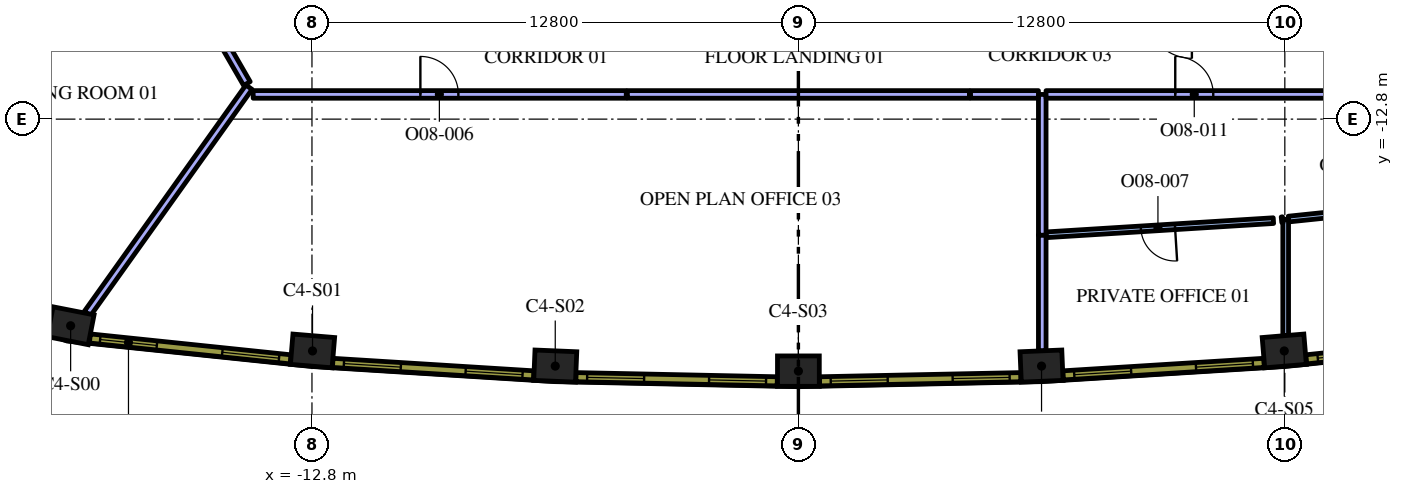
"""IFC4 building model, lengths in metres.
Left out: names, types, materials, properties, quantities, classifications, styles, units other than length and angle.
Written with IfcOpenShell. Run it as: python <this file> out.ifc"""

import sys

from ifc_helpers import new_model, si_unit, direction, frame, frame_2d, origin, origin_2d, place, context, subcontext, project, spatial, rectangle, extrude, element, fill, save


model = new_model("IFC4")
c1 = context("Model", 3, precision=1e-05, world=origin(), true_north=direction((0.0, 1.0)))
c2 = subcontext(c1, "Body", "Model", "MODEL_VIEW")
j1 = project(units=[si_unit("LENGTHUNIT", "METRE"), si_unit("PLANEANGLEUNIT", "RADIAN")], contexts=[c1])
p1 = place(None, origin())
s1 = spatial("IfcSite", under=j1, at=p1, CompositionType="ELEMENT")
p2 = place(p1, origin())
s2 = spatial("IfcBuilding", under=s1, at=p2, CompositionType="ELEMENT")
p3 = place(p2, frame((0.0, 0.0, 235.2)))
s3 = spatial("IfcBuildingStorey", under=s2, at=p3, CompositionType="ELEMENT", Elevation=235.2)
for number, where, z_axis, x_axis in (
    (1, (-19.15, -18.237, 0.0), (0.0, 0.0, 1.0), (0.981, -0.192, 0.0)),
    (2, (-12.785, -18.9, 0.0), (0.0, 0.0, 1.0), (0.997, -0.083, 0.0)),
    (3, (-6.398, -19.298, 0.0), (0.0, 0.0, 1.0), (0.999, -0.041, 0.0)),
    (4, (0.0, -19.431, 0.0), (0.0, 0.0, 1.0), (1.0, 0.0, 0.0)),
    (5, (6.398, -19.298, 0.0), (0.0, 0.0, 1.0), (0.999, 0.041, 0.0)),
    (6, (12.785, -18.9, 0.0), (0.0, 0.0, 1.0), (0.997, 0.083, 0.0)),
):
    element("IfcColumn", number, at=place(p3, frame(where, z_axis=z_axis, x_axis=x_axis)), inside=s3, PredefinedType="COLUMN", context=c2, shape_type="SweptSolid", body=[
        extrude(rectangle(XDim=1.1, YDim=0.8, at=origin_2d()), origin(), (0.0, 0.0, 1.0), 4.2),
    ])
p4 = place(p3, frame((-14.457, -11.96, 0.0), z_axis=(0.0, 0.0, 1.0), x_axis=(-0.581023578026, -0.813886725397, 0.0)))
e7 = element("IfcWall", 7, at=p4, inside=s3, PredefinedType="PARTITIONING", context=c2, shape_type="SweptSolid", body=[
    extrude(rectangle(XDim=7.318, YDim=0.2, at=frame_2d((3.659, 0.0))), origin(), (0.0, 0.0, 1.0), 3.45),
])
p5 = place(p3, frame((-17.531, -6.635, 0.0), z_axis=(0.0, 0.0, 1.0), x_axis=(0.500009459589, -0.866019942219, 0.0)))
e8 = element("IfcWall", 8, at=p5, inside=s3, PredefinedType="PARTITIONING", context=c2, shape_type="SweptSolid", body=[
    extrude(rectangle(XDim=6.038, YDim=0.2, at=frame_2d((3.019, 0.0))), origin(), (0.0, 0.0, 1.0), 3.45),
])
p6 = place(p5, frame((2.5, 0.0, 0.0)))
e9 = element("IfcOpeningElement", 9, at=p6, cuts=e8, PredefinedType="OPENING", context=c2, shape_type="SweptSolid", body=[
    extrude(rectangle(XDim=1.0, YDim=2.1, at=frame_2d((0.5, 1.05))), frame((0.0, 0.11, 0.0), z_axis=(0.0, -1.0, 0.0), x_axis=(1.0, 0.0, 0.0)), (0.0, 0.0, 1.0), 0.22),
])
p7 = place(p3, frame((6.417, -15.846, 0.0), z_axis=(0.0, 0.0, 1.0), x_axis=(0.0, -1.0, 0.0)))
e10 = element("IfcWall", 10, at=p7, inside=s3, PredefinedType="PARTITIONING", context=c2, shape_type="SweptSolid", body=[
    extrude(rectangle(XDim=3.051, YDim=0.2, at=frame_2d((1.525, 0.0))), origin(), (0.0, 0.0, 1.0), 3.45),
])
p8 = place(p3, frame((6.417, -12.15, 0.0), z_axis=(0.0, 0.0, 1.0), x_axis=(0.0, -1.0, 0.0)))
e11 = element("IfcWall", 11, at=p8, inside=s3, PredefinedType="PARTITIONING", context=c2, shape_type="SweptSolid", body=[
    extrude(rectangle(XDim=3.704, YDim=0.2, at=frame_2d((1.852, 0.0))), origin(), (0.0, 0.0, 1.0), 3.45),
])
p9 = place(p3, frame((-4.5, -12.15, 0.0), z_axis=(0.0, 0.0, 1.0), x_axis=(1.0, 0.0, 0.0)))
e12 = element("IfcWall", 12, at=p9, inside=s3, PredefinedType="PARTITIONING", context=c2, shape_type="SweptSolid", body=[
    extrude(rectangle(XDim=9.0, YDim=0.2, at=frame_2d((4.5, 0.0))), origin(), (0.0, 0.0, 1.0), 3.45),
])
p10 = place(p3, frame((-14.347, -12.15, 0.0), z_axis=(0.0, 0.0, 1.0), x_axis=(1.0, 0.0, 0.0)))
e13 = element("IfcWall", 13, at=p10, inside=s3, PredefinedType="PARTITIONING", context=c2, shape_type="SweptSolid", body=[
    extrude(rectangle(XDim=9.817, YDim=0.2, at=frame_2d((4.909, 0.0))), origin(), (0.0, 0.0, 1.0), 3.45),
])
p11 = place(p10, frame((4.4, 0.0, 0.0)))
e14 = element("IfcOpeningElement", 14, at=p11, cuts=e13, PredefinedType="OPENING", context=c2, shape_type="SweptSolid", body=[
    extrude(rectangle(XDim=1.0, YDim=2.1, at=frame_2d((0.5, 1.05))), frame((0.0, 0.11, 0.0), z_axis=(0.0, -1.0, 0.0), x_axis=(1.0, 0.0, 0.0)), (0.0, 0.0, 1.0), 0.22),
])
p12 = place(p3, frame((4.53, -12.15, 0.0), z_axis=(0.0, 0.0, 1.0), x_axis=(1.0, 0.0, 0.0)))
e15 = element("IfcWall", 15, at=p12, inside=s3, PredefinedType="PARTITIONING", context=c2, shape_type="SweptSolid", body=[
    extrude(rectangle(XDim=1.787, YDim=0.2, at=frame_2d((0.894, 0.0))), origin(), (0.0, 0.0, 1.0), 3.45),
])
p13 = place(p3, frame((12.823, -15.437, 0.0), z_axis=(0.0, 0.0, 1.0), x_axis=(0.0, -1.0, 0.0)))
e16 = element("IfcWall", 16, at=p13, inside=s3, PredefinedType="PARTITIONING", context=c2, shape_type="SweptSolid", body=[
    extrude(rectangle(XDim=3.058, YDim=0.15, at=frame_2d((1.529, 0.0))), origin(), (0.0, 0.0, 1.0), 3.45),
])
p14 = place(p3, frame((12.5, -15.471, 0.0), z_axis=(0.0, 0.0, 1.0), x_axis=(-0.998061916726, -0.0622286942, 0.0)))
e17 = element("IfcWall", 17, at=p14, inside=s3, PredefinedType="PARTITIONING", context=c2, shape_type="SweptSolid", body=[
    extrude(rectangle(XDim=5.995, YDim=0.15, at=frame_2d((2.998, 0.0))), origin(), (0.0, 0.0, 1.0), 3.45),
])
p15 = place(p14, frame((2.595, 0.0, 0.0)))
e18 = element("IfcOpeningElement", 18, at=p15, cuts=e17, PredefinedType="OPENING", context=c2, shape_type="SweptSolid", body=[
    extrude(rectangle(XDim=0.9, YDim=2.1, at=frame_2d((0.45, 1.05))), frame((0.0, 0.085, 0.0), z_axis=(0.0, -1.0, 0.0), x_axis=(1.0, 0.0, 0.0)), (0.0, 0.0, 1.0), 0.17),
])
p16 = place(p3, frame((12.713, -15.448, 0.0), z_axis=(0.0, 0.0, 1.0), x_axis=(0.995106821048, 0.098804932586, 0.0)))
e19 = element("IfcWall", 19, at=p16, inside=s3, PredefinedType="PARTITIONING", context=c2, shape_type="SweptSolid", body=[
    extrude(rectangle(XDim=0.035, YDim=0.15, at=frame_2d((0.017, 0.0))), origin(), (0.0, 0.0, 1.0), 3.45),
])
p17 = place(p3, frame((16.569, -15.047, 0.0), z_axis=(0.0, 0.0, 1.0), x_axis=(-0.994621532294, -0.103576095197, 0.0)))
e20 = element("IfcWall", 20, at=p17, inside=s3, PredefinedType="PARTITIONING", context=c2, shape_type="SweptSolid", body=[
    extrude(rectangle(XDim=3.691, YDim=0.15, at=frame_2d((1.846, 0.0))), origin(), (0.0, 0.0, 1.0), 3.45),
])
p18 = place(p17, frame((1.391, 0.0, 0.0)))
e21 = element("IfcOpeningElement", 21, at=p18, cuts=e20, PredefinedType="OPENING", context=c2, shape_type="SweptSolid", body=[
    extrude(rectangle(XDim=0.9, YDim=2.1, at=frame_2d((0.45, 1.05))), frame((0.0, 0.085, 0.0), z_axis=(0.0, -1.0, 0.0), x_axis=(1.0, 0.0, 0.0)), (0.0, 0.0, 1.0), 0.17),
])
p19 = place(p3, frame((6.517, -12.15, 0.0), z_axis=(0.0, 0.0, 1.0), x_axis=(1.0, 0.0, 0.0)))
e22 = element("IfcWall", 22, at=p19, inside=s3, PredefinedType="PARTITIONING", context=c2, shape_type="SweptSolid", body=[
    extrude(rectangle(XDim=7.83, YDim=0.2, at=frame_2d((3.915, 0.0))), origin(), (0.0, 0.0, 1.0), 3.45),
])
p20 = place(p19, frame((3.4, 0.0, 0.0)))
e23 = element("IfcOpeningElement", 23, at=p20, cuts=e22, PredefinedType="OPENING", context=c2, shape_type="SweptSolid", body=[
    extrude(rectangle(XDim=1.0, YDim=2.1, at=frame_2d((0.5, 1.05))), frame((0.0, 0.11, 0.0), z_axis=(0.0, -1.0, 0.0), x_axis=(1.0, 0.0, 0.0)), (0.0, 0.0, 1.0), 0.22),
])
p21 = place(p3, frame((-18.644, -18.571, 0.0), z_axis=(0.0, 0.0, 1.0), x_axis=(0.994621961215, -0.103571976272, 0.0)))
e24 = element("IfcWall", 24, at=p21, inside=s3, PredefinedType="SOLIDWALL", context=c2, shape_type="SweptSolid", body=[
    extrude(rectangle(XDim=5.311, YDim=0.24, at=frame_2d((2.655, 0.0))), origin(), (0.0, 0.0, 1.0), 3.95),
])
p22 = place(p21, frame((0.271, 0.0, 0.9)))
e25 = element("IfcOpeningElement", 25, at=p22, cuts=e24, PredefinedType="OPENING", context=c2, shape_type="SweptSolid", body=[
    extrude(rectangle(XDim=1.5, YDim=2.55, at=frame_2d((0.75, 1.275))), frame((0.0, 0.13, 0.0), z_axis=(0.0, -1.0, 0.0), x_axis=(1.0, 0.0, 0.0)), (0.0, 0.0, 1.0), 0.26),
])
p23 = place(p21, frame((3.504, 0.0, 0.9)))
e26 = element("IfcOpeningElement", 26, at=p23, cuts=e24, PredefinedType="OPENING", context=c2, shape_type="SweptSolid", body=[
    extrude(rectangle(XDim=1.5, YDim=2.55, at=frame_2d((0.75, 1.275))), frame((0.0, 0.13, 0.0), z_axis=(0.0, -1.0, 0.0), x_axis=(1.0, 0.0, 0.0)), (0.0, 0.0, 1.0), 0.26),
])
p24 = place(p3, frame((-12.253, -19.213, 0.0), z_axis=(0.0, 0.0, 1.0), x_axis=(0.9980633213, -0.062206162685, 0.0)))
e27 = element("IfcWall", 27, at=p24, inside=s3, PredefinedType="SOLIDWALL", context=c2, shape_type="SweptSolid", body=[
    extrude(rectangle(XDim=5.298, YDim=0.24, at=frame_2d((2.649, 0.0))), origin(), (0.0, 0.0, 1.0), 3.95),
])
p25 = place(p24, frame((0.294, 0.0, 0.9)))
e28 = element("IfcOpeningElement", 28, at=p25, cuts=e27, PredefinedType="OPENING", context=c2, shape_type="SweptSolid", body=[
    extrude(rectangle(XDim=1.5, YDim=2.55, at=frame_2d((0.75, 1.275))), frame((0.0, 0.13, 0.0), z_axis=(0.0, -1.0, 0.0), x_axis=(1.0, 0.0, 0.0)), (0.0, 0.0, 1.0), 0.26),
])
p26 = place(p24, frame((3.504, 0.0, 0.9)))
e29 = element("IfcOpeningElement", 29, at=p26, cuts=e27, PredefinedType="OPENING", context=c2, shape_type="SweptSolid", body=[
    extrude(rectangle(XDim=1.5, YDim=2.55, at=frame_2d((0.75, 1.275))), frame((0.0, 0.13, 0.0), z_axis=(0.0, -1.0, 0.0), x_axis=(1.0, 0.0, 0.0)), (0.0, 0.0, 1.0), 0.26),
])
p27 = place(p3, frame((-5.854, -19.589, 0.0), z_axis=(0.0, 0.0, 1.0), x_axis=(0.999784035184, -0.020781794712, 0.0)))
e30 = element("IfcWall", 30, at=p27, inside=s3, PredefinedType="SOLIDWALL", context=c2, shape_type="SweptSolid", body=[
    extrude(rectangle(XDim=5.298, YDim=0.24, at=frame_2d((2.649, 0.0))), origin(), (0.0, 0.0, 1.0), 3.95),
])
p28 = place(p27, frame((0.294, 0.0, 0.9)))
e31 = element("IfcOpeningElement", 31, at=p28, cuts=e30, PredefinedType="OPENING", context=c2, shape_type="SweptSolid", body=[
    extrude(rectangle(XDim=1.5, YDim=2.55, at=frame_2d((0.75, 1.275))), frame((0.0, 0.13, 0.0), z_axis=(0.0, -1.0, 0.0), x_axis=(1.0, 0.0, 0.0)), (0.0, 0.0, 1.0), 0.26),
])
p29 = place(p27, frame((3.504, 0.0, 0.9)))
e32 = element("IfcOpeningElement", 32, at=p29, cuts=e30, PredefinedType="OPENING", context=c2, shape_type="SweptSolid", body=[
    extrude(rectangle(XDim=1.5, YDim=2.55, at=frame_2d((0.75, 1.275))), frame((0.0, 0.13, 0.0), z_axis=(0.0, -1.0, 0.0), x_axis=(1.0, 0.0, 0.0)), (0.0, 0.0, 1.0), 0.26),
])
p30 = place(p3, frame((0.556, -19.699, 0.0), z_axis=(0.0, 0.0, 1.0), x_axis=(0.999784035184, 0.020781794712, 0.0)))
e33 = element("IfcWall", 33, at=p30, inside=s3, PredefinedType="SOLIDWALL", context=c2, shape_type="SweptSolid", body=[
    extrude(rectangle(XDim=5.298, YDim=0.24, at=frame_2d((2.649, 0.0))), origin(), (0.0, 0.0, 1.0), 3.95),
])
p31 = place(p30, frame((0.294, 0.0, 0.9)))
e34 = element("IfcOpeningElement", 34, at=p31, cuts=e33, PredefinedType="OPENING", context=c2, shape_type="SweptSolid", body=[
    extrude(rectangle(XDim=1.5, YDim=2.55, at=frame_2d((0.75, 1.275))), frame((0.0, 0.13, 0.0), z_axis=(0.0, -1.0, 0.0), x_axis=(1.0, 0.0, 0.0)), (0.0, 0.0, 1.0), 0.26),
])
p32 = place(p30, frame((3.504, 0.0, 0.9)))
e35 = element("IfcOpeningElement", 35, at=p32, cuts=e33, PredefinedType="OPENING", context=c2, shape_type="SweptSolid", body=[
    extrude(rectangle(XDim=1.5, YDim=2.55, at=frame_2d((0.75, 1.275))), frame((0.0, 0.13, 0.0), z_axis=(0.0, -1.0, 0.0), x_axis=(1.0, 0.0, 0.0)), (0.0, 0.0, 1.0), 0.26),
])
p33 = place(p3, frame((6.965, -19.543, 0.0), z_axis=(0.0, 0.0, 1.0), x_axis=(0.9980633213, 0.062206162685, 0.0)))
e36 = element("IfcWall", 36, at=p33, inside=s3, PredefinedType="SOLIDWALL", context=c2, shape_type="SweptSolid", body=[
    extrude(rectangle(XDim=5.298, YDim=0.24, at=frame_2d((2.649, 0.0))), origin(), (0.0, 0.0, 1.0), 3.95),
])
p34 = place(p33, frame((0.295, 0.0, 0.9)))
e37 = element("IfcOpeningElement", 37, at=p34, cuts=e36, PredefinedType="OPENING", context=c2, shape_type="SweptSolid", body=[
    extrude(rectangle(XDim=1.5, YDim=2.55, at=frame_2d((0.75, 1.275))), frame((0.0, 0.13, 0.0), z_axis=(0.0, -1.0, 0.0), x_axis=(1.0, 0.0, 0.0)), (0.0, 0.0, 1.0), 0.26),
])
p35 = place(p33, frame((3.504, 0.0, 0.9)))
e38 = element("IfcOpeningElement", 38, at=p35, cuts=e36, PredefinedType="OPENING", context=c2, shape_type="SweptSolid", body=[
    extrude(rectangle(XDim=1.5, YDim=2.55, at=frame_2d((0.75, 1.275))), frame((0.0, 0.13, 0.0), z_axis=(0.0, -1.0, 0.0), x_axis=(1.0, 0.0, 0.0)), (0.0, 0.0, 1.0), 0.26),
])
p36 = place(p3, frame((13.362, -19.121, 0.0), z_axis=(0.0, 0.0, 1.0), x_axis=(0.994621961215, 0.103571976272, 0.0)))
e39 = element("IfcWall", 39, at=p36, inside=s3, PredefinedType="SOLIDWALL", context=c2, shape_type="SweptSolid", body=[
    extrude(rectangle(XDim=5.311, YDim=0.24, at=frame_2d((2.655, 0.0))), origin(), (0.0, 0.0, 1.0), 3.95),
])
p37 = place(p36, frame((0.306, 0.0, 0.9)))
e40 = element("IfcOpeningElement", 40, at=p37, cuts=e39, PredefinedType="OPENING", context=c2, shape_type="SweptSolid", body=[
    extrude(rectangle(XDim=1.5, YDim=2.55, at=frame_2d((0.75, 1.275))), frame((0.0, 0.13, 0.0), z_axis=(0.0, -1.0, 0.0), x_axis=(1.0, 0.0, 0.0)), (0.0, 0.0, 1.0), 0.26),
])
p38 = place(p36, frame((3.539, 0.0, 0.9)))
e41 = element("IfcOpeningElement", 41, at=p38, cuts=e39, PredefinedType="OPENING", context=c2, shape_type="SweptSolid", body=[
    extrude(rectangle(XDim=1.5, YDim=2.55, at=frame_2d((0.75, 1.275))), frame((0.0, 0.13, 0.0), z_axis=(0.0, -1.0, 0.0), x_axis=(1.0, 0.0, 0.0)), (0.0, 0.0, 1.0), 0.26),
])
p39 = place(p11, origin())
e42 = element("IfcDoor", 42, at=p39, inside=s3, OperationType="SINGLE_SWING_LEFT", PredefinedType="DOOR", context=c2, shape_type="SweptSolid", body=[
    extrude(rectangle(XDim=1.0, YDim=2.1, at=frame_2d((0.5, 1.05))), frame((0.0, 0.025, 0.0), z_axis=(0.0, -1.0, 0.0), x_axis=(1.0, 0.0, 0.0)), (0.0, 0.0, 1.0), 0.05),
])
fill(e14, e42)
p40 = place(p15, origin())
e43 = element("IfcDoor", 43, at=p40, inside=s3, OperationType="SINGLE_SWING_RIGHT", PredefinedType="DOOR", context=c2, shape_type="SweptSolid", body=[
    extrude(rectangle(XDim=0.9, YDim=2.1, at=frame_2d((0.45, 1.05))), frame((0.0, 0.025, 0.0), z_axis=(0.0, -1.0, 0.0), x_axis=(1.0, 0.0, 0.0)), (0.0, 0.0, 1.0), 0.05),
])
fill(e18, e43)
p41 = place(p20, origin())
e44 = element("IfcDoor", 44, at=p41, inside=s3, OperationType="SINGLE_SWING_LEFT", PredefinedType="DOOR", context=c2, shape_type="SweptSolid", body=[
    extrude(rectangle(XDim=1.0, YDim=2.1, at=frame_2d((0.5, 1.05))), frame((0.0, 0.025, 0.0), z_axis=(0.0, -1.0, 0.0), x_axis=(1.0, 0.0, 0.0)), (0.0, 0.0, 1.0), 0.05),
])
fill(e23, e44)
p42 = place(p22, origin())
e45 = element("IfcWindow", 45, at=p42, inside=s3, PartitioningType="SINGLE_PANEL", PredefinedType="WINDOW", context=c2, shape_type="SweptSolid", body=[
    extrude(rectangle(XDim=1.5, YDim=2.55, at=frame_2d((0.75, 1.275))), frame((0.0, 0.04, 0.0), z_axis=(0.0, -1.0, 0.0), x_axis=(1.0, 0.0, 0.0)), (0.0, 0.0, 1.0), 0.06),
])
fill(e25, e45)
p43 = place(p23, origin())
e46 = element("IfcWindow", 46, at=p43, inside=s3, PartitioningType="SINGLE_PANEL", PredefinedType="WINDOW", context=c2, shape_type="SweptSolid", body=[
    extrude(rectangle(XDim=1.5, YDim=2.55, at=frame_2d((0.75, 1.275))), frame((0.0, 0.04, 0.0), z_axis=(0.0, -1.0, 0.0), x_axis=(1.0, 0.0, 0.0)), (0.0, 0.0, 1.0), 0.06),
])
fill(e26, e46)
p44 = place(p25, origin())
e47 = element("IfcWindow", 47, at=p44, inside=s3, PartitioningType="SINGLE_PANEL", PredefinedType="WINDOW", context=c2, shape_type="SweptSolid", body=[
    extrude(rectangle(XDim=1.5, YDim=2.55, at=frame_2d((0.75, 1.275))), frame((0.0, 0.04, 0.0), z_axis=(0.0, -1.0, 0.0), x_axis=(1.0, 0.0, 0.0)), (0.0, 0.0, 1.0), 0.06),
])
fill(e28, e47)
p45 = place(p26, origin())
e48 = element("IfcWindow", 48, at=p45, inside=s3, PartitioningType="SINGLE_PANEL", PredefinedType="WINDOW", context=c2, shape_type="SweptSolid", body=[
    extrude(rectangle(XDim=1.5, YDim=2.55, at=frame_2d((0.75, 1.275))), frame((0.0, 0.04, 0.0), z_axis=(0.0, -1.0, 0.0), x_axis=(1.0, 0.0, 0.0)), (0.0, 0.0, 1.0), 0.06),
])
fill(e29, e48)
p46 = place(p28, origin())
e49 = element("IfcWindow", 49, at=p46, inside=s3, PartitioningType="SINGLE_PANEL", PredefinedType="WINDOW", context=c2, shape_type="SweptSolid", body=[
    extrude(rectangle(XDim=1.5, YDim=2.55, at=frame_2d((0.75, 1.275))), frame((0.0, 0.04, 0.0), z_axis=(0.0, -1.0, 0.0), x_axis=(1.0, 0.0, 0.0)), (0.0, 0.0, 1.0), 0.06),
])
fill(e31, e49)
p47 = place(p29, origin())
e50 = element("IfcWindow", 50, at=p47, inside=s3, PartitioningType="SINGLE_PANEL", PredefinedType="WINDOW", context=c2, shape_type="SweptSolid", body=[
    extrude(rectangle(XDim=1.5, YDim=2.55, at=frame_2d((0.75, 1.275))), frame((0.0, 0.04, 0.0), z_axis=(0.0, -1.0, 0.0), x_axis=(1.0, 0.0, 0.0)), (0.0, 0.0, 1.0), 0.06),
])
fill(e32, e50)
p48 = place(p31, origin())
e51 = element("IfcWindow", 51, at=p48, inside=s3, PartitioningType="SINGLE_PANEL", PredefinedType="WINDOW", context=c2, shape_type="SweptSolid", body=[
    extrude(rectangle(XDim=1.5, YDim=2.55, at=frame_2d((0.75, 1.275))), frame((0.0, 0.04, 0.0), z_axis=(0.0, -1.0, 0.0), x_axis=(1.0, 0.0, 0.0)), (0.0, 0.0, 1.0), 0.06),
])
fill(e34, e51)
p49 = place(p32, origin())
e52 = element("IfcWindow", 52, at=p49, inside=s3, PartitioningType="SINGLE_PANEL", PredefinedType="WINDOW", context=c2, shape_type="SweptSolid", body=[
    extrude(rectangle(XDim=1.5, YDim=2.55, at=frame_2d((0.75, 1.275))), frame((0.0, 0.04, 0.0), z_axis=(0.0, -1.0, 0.0), x_axis=(1.0, 0.0, 0.0)), (0.0, 0.0, 1.0), 0.06),
])
fill(e35, e52)
p50 = place(p34, origin())
e53 = element("IfcWindow", 53, at=p50, inside=s3, PartitioningType="SINGLE_PANEL", PredefinedType="WINDOW", context=c2, shape_type="SweptSolid", body=[
    extrude(rectangle(XDim=1.5, YDim=2.55, at=frame_2d((0.75, 1.275))), frame((0.0, 0.04, 0.0), z_axis=(0.0, -1.0, 0.0), x_axis=(1.0, 0.0, 0.0)), (0.0, 0.0, 1.0), 0.06),
])
fill(e37, e53)
p51 = place(p35, origin())
e54 = element("IfcWindow", 54, at=p51, inside=s3, PartitioningType="SINGLE_PANEL", PredefinedType="WINDOW", context=c2, shape_type="SweptSolid", body=[
    extrude(rectangle(XDim=1.5, YDim=2.55, at=frame_2d((0.75, 1.275))), frame((0.0, 0.04, 0.0), z_axis=(0.0, -1.0, 0.0), x_axis=(1.0, 0.0, 0.0)), (0.0, 0.0, 1.0), 0.06),
])
fill(e38, e54)
p52 = place(p37, origin())
e55 = element("IfcWindow", 55, at=p52, inside=s3, PartitioningType="SINGLE_PANEL", PredefinedType="WINDOW", context=c2, shape_type="SweptSolid", body=[
    extrude(rectangle(XDim=1.5, YDim=2.55, at=frame_2d((0.75, 1.275))), frame((0.0, 0.04, 0.0), z_axis=(0.0, -1.0, 0.0), x_axis=(1.0, 0.0, 0.0)), (0.0, 0.0, 1.0), 0.06),
])
fill(e40, e55)
save(model, sys.argv[1])
